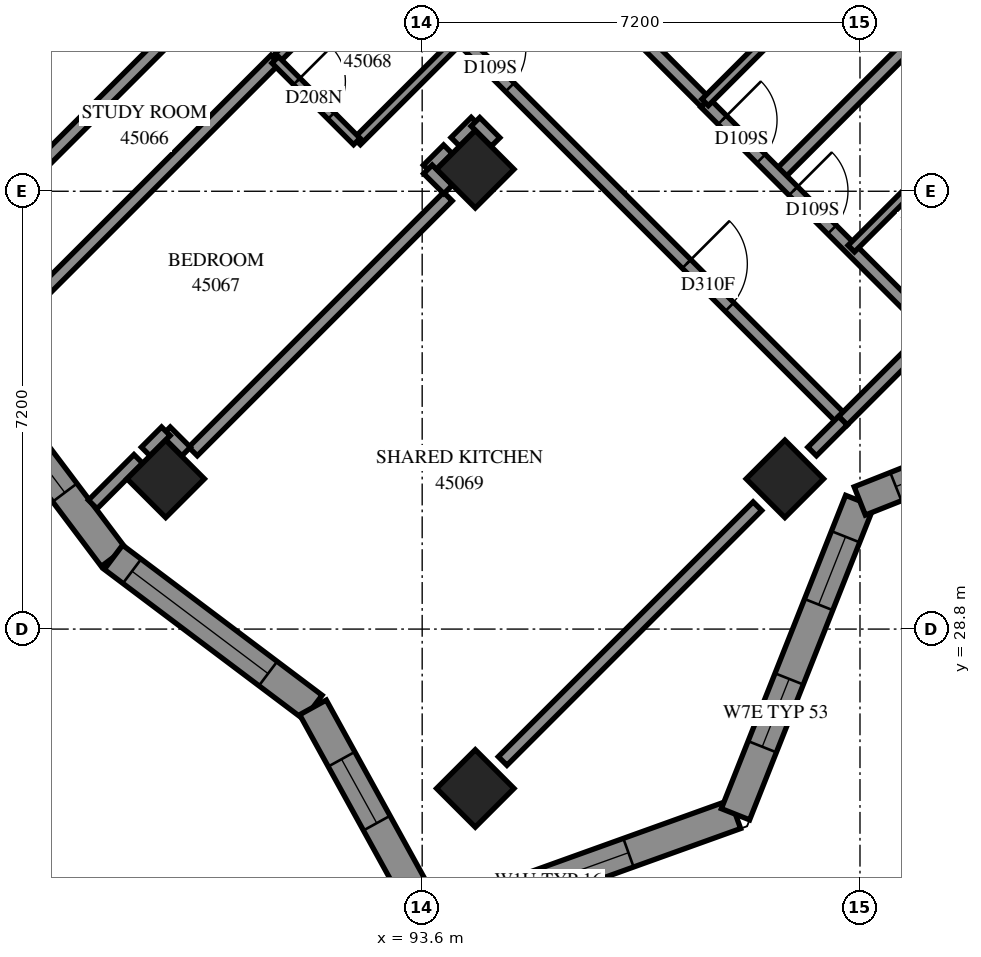
"""IFC4 building model, lengths in metres.
Left out: names, types, materials, properties, quantities, classifications, styles, units other than length and angle.
Written with IfcOpenShell. Run it as: python <this file> out.ifc"""

import sys

from ifc_helpers import new_model, si_unit, direction, frame, frame_2d, origin, origin_2d, place, context, subcontext, project, spatial, polyline, rectangle, outline, extrude, element, fill, save


model = new_model("IFC4")
c1 = context("Model", 3, precision=1e-05, world=origin(), true_north=direction((0.0, 1.0)))
c2 = subcontext(c1, "Body", "Model", "MODEL_VIEW")
j1 = project(units=[si_unit("LENGTHUNIT", "METRE"), si_unit("PLANEANGLEUNIT", "RADIAN")], contexts=[c1])
p1 = place(None, origin())
s1 = spatial("IfcSite", under=j1, at=p1, CompositionType="ELEMENT")
p2 = place(p1, origin())
s2 = spatial("IfcBuilding", under=s1, at=p2, CompositionType="ELEMENT")
p3 = place(p2, frame((0.0, 0.0, 166.0)))
s3 = spatial("IfcBuildingStorey", under=s2, at=p3, CompositionType="ELEMENT", Elevation=166.0)
for number, where, z_axis, x_axis in (
    (1, (94.474, 36.362, 0.0), (0.0, 0.0, 1.0), (0.707, -0.707, 0.0)),
    (2, (89.382, 31.271, 0.0), (0.0, 0.0, 1.0), (0.707, -0.707, 0.0)),
    (3, (99.565, 31.271, 0.0), (0.0, 0.0, 1.0), (0.707, -0.707, 0.0)),
    (4, (94.474, 26.18, 0.0), (0.0, 0.0, 1.0), (0.707, -0.707, 0.0)),
):
    element("IfcColumn", number, at=place(p3, frame(where, z_axis=z_axis, x_axis=x_axis)), inside=s3, PredefinedType="COLUMN", context=c2, shape_type="SweptSolid", body=[
        extrude(rectangle(XDim=0.9, YDim=0.9, at=origin_2d()), origin(), (0.0, 0.0, 1.0), 3.1),
    ])
p4 = place(p3, frame((93.761, 23.961, 0.0), z_axis=(0.0, 0.0, 1.0), x_axis=(0.9410639337, 0.3382287283, 0.0)))
e5 = element("IfcWall", 5, at=p4, inside=s3, PredefinedType="SOLIDWALL", context=c2, shape_type="SweptSolid", body=[
    extrude(outline(polyline([(-0.213, -0.25), (5.417, -0.25), (5.191, 0.25), (0.213, 0.25), (-0.213, -0.25)])), origin(), (0.0, 0.0, 1.0), 3.1),
])
p5 = place(p4, frame((0.634, 0.0, 0.45)))
e6 = element("IfcOpeningElement", 6, at=p5, cuts=e5, PredefinedType="OPENING", context=c2, shape_type="SweptSolid", body=[
    extrude(rectangle(XDim=2.8, YDim=2.5, at=frame_2d((1.4, 1.25))), frame((0.0, 0.26, 0.0), z_axis=(0.0, -1.0, 0.0), x_axis=(1.0, 0.0, 0.0)), (0.0, 0.0, 1.0), 0.52),
])
p6 = place(p3, frame((98.752, 25.755, 0.0), z_axis=(0.0, 0.0, 1.0), x_axis=(0.3687203301, 0.9295403801, 0.0)))
e7 = element("IfcWall", 7, at=p6, inside=s3, PredefinedType="SOLIDWALL", context=c2, shape_type="SweptSolid", body=[
    extrude(outline(polyline([(-0.113, -0.25), (5.435, -0.25), (5.651, 0.25), (0.113, 0.25), (-0.113, -0.25)])), origin(), (0.0, 0.0, 1.0), 3.1),
])
p7 = place(p6, frame((1.194, 0.0, 0.45)))
e8 = element("IfcOpeningElement", 8, at=p7, cuts=e7, PredefinedType="OPENING", context=c2, shape_type="SweptSolid", body=[
    extrude(rectangle(XDim=1.2, YDim=2.5, at=frame_2d((0.6, 1.25))), frame((0.0, 0.26, 0.0), z_axis=(0.0, -1.0, 0.0), x_axis=(1.0, 0.0, 0.0)), (0.0, 0.0, 1.0), 0.52),
])
p8 = place(p6, frame((3.709, 0.0, 0.45)))
e9 = element("IfcOpeningElement", 9, at=p8, cuts=e7, PredefinedType="OPENING", context=c2, shape_type="SweptSolid", body=[
    extrude(rectangle(XDim=1.2, YDim=2.5, at=frame_2d((0.6, 1.25))), frame((0.0, 0.26, 0.0), z_axis=(0.0, -1.0, 0.0), x_axis=(1.0, 0.0, 0.0)), (0.0, 0.0, 1.0), 0.52),
])
p9 = place(p3, frame((100.796, 30.907, 0.0), z_axis=(0.0, 0.0, 1.0), x_axis=(0.9295366495, 0.3687297347, 0.0)))
e10 = element("IfcWall", 10, at=p9, inside=s3, PredefinedType="SOLIDWALL", context=c2, shape_type="SweptSolid", body=[
    extrude(outline(polyline([(0.108, -0.25), (5.656, -0.25), (5.43, 0.25), (-0.108, 0.25), (0.108, -0.25)])), origin(), (0.0, 0.0, 1.0), 3.1),
])
p10 = place(p9, frame((0.638, 0.0, 0.45)))
e11 = element("IfcOpeningElement", 11, at=p10, cuts=e10, PredefinedType="OPENING", context=c2, shape_type="SweptSolid", body=[
    extrude(rectangle(XDim=2.8, YDim=2.5, at=frame_2d((1.4, 1.25))), frame((0.0, 0.26, 0.0), z_axis=(0.0, -1.0, 0.0), x_axis=(1.0, 0.0, 0.0)), (0.0, 0.0, 1.0), 0.52),
])
p11 = place(p3, frame((86.065, 33.248, 0.0), z_axis=(0.0, 0.0, 1.0), x_axis=(0.6012086295, -0.7990920997, 0.0)))
e12 = element("IfcWall", 12, at=p11, inside=s3, PredefinedType="SOLIDWALL", context=c2, shape_type="SweptSolid", body=[
    extrude(outline(polyline([(0.035, -0.25), (4.124, -0.25), (4.053, 0.25), (-0.035, 0.25), (0.035, -0.25)])), origin(), (0.0, 0.0, 1.0), 3.1),
])
p12 = place(p11, frame((0.958, 0.0, 0.7)))
e13 = element("IfcOpeningElement", 13, at=p12, cuts=e12, PredefinedType="OPENING", context=c2, shape_type="SweptSolid", body=[
    extrude(rectangle(XDim=1.8, YDim=2.2, at=frame_2d((0.9, 1.1))), frame((0.0, 0.26, 0.0), z_axis=(0.0, -1.0, 0.0), x_axis=(1.0, 0.0, 0.0)), (0.0, 0.0, 1.0), 0.52),
])
p13 = place(p3, frame((88.523, 29.981, 0.0), z_axis=(0.0, 0.0, 1.0), x_axis=(0.7990931862, -0.6012071854, 0.0)))
e14 = element("IfcWall", 14, at=p13, inside=s3, PredefinedType="SOLIDWALL", context=c2, shape_type="SweptSolid", body=[
    extrude(outline(polyline([(-0.035, -0.25), (4.053, -0.25), (4.16, 0.25), (0.035, 0.25), (-0.035, -0.25)])), origin(), (0.0, 0.0, 1.0), 3.1),
])
p14 = place(p13, frame((0.382, 0.0, 0.45)))
e15 = element("IfcOpeningElement", 15, at=p14, cuts=e14, PredefinedType="OPENING", context=c2, shape_type="SweptSolid", body=[
    extrude(rectangle(XDim=2.8, YDim=2.5, at=frame_2d((1.4, 1.25))), frame((0.0, 0.26, 0.0), z_axis=(0.0, -1.0, 0.0), x_axis=(1.0, 0.0, 0.0)), (0.0, 0.0, 1.0), 0.52),
])
p15 = place(p3, frame((91.804, 27.512, 0.0), z_axis=(0.0, 0.0, 1.0), x_axis=(0.4825680749, -0.8758584664, 0.0)))
e16 = element("IfcWall", 16, at=p15, inside=s3, PredefinedType="SOLIDWALL", context=c2, shape_type="SweptSolid", body=[
    extrude(outline(polyline([(0.054, -0.25), (4.268, -0.25), (3.841, 0.25), (-0.054, 0.25), (0.054, -0.25)])), origin(), (0.0, 0.0, 1.0), 3.1),
])
p16 = place(p15, frame((0.973, 0.0, 0.45)))
e17 = element("IfcOpeningElement", 17, at=p16, cuts=e16, PredefinedType="OPENING", context=c2, shape_type="SweptSolid", body=[
    extrude(rectangle(XDim=1.2, YDim=2.5, at=frame_2d((0.6, 1.25))), frame((0.0, 0.26, 0.0), z_axis=(0.0, -1.0, 0.0), x_axis=(1.0, 0.0, 0.0)), (0.0, 0.0, 1.0), 0.52),
])
p17 = place(p3, frame((91.967, 40.785, 0.0), z_axis=(0.0, 0.0, 1.0), x_axis=(0.7071067812, -0.7071067812, 0.0)))
e18 = element("IfcWall", 18, at=p17, inside=s3, PredefinedType="PARTITIONING", context=c2, shape_type="SweptSolid", body=[
    extrude(rectangle(XDim=12.1, YDim=0.2, at=frame_2d((6.05, 0.0))), origin(), (0.0, 0.0, 1.0), 3.1),
])
p18 = place(p17, frame((3.448, 0.0, 0.0)))
e19 = element("IfcOpeningElement", 19, at=p18, cuts=e18, PredefinedType="OPENING", context=c2, shape_type="SweptSolid", body=[
    extrude(rectangle(XDim=0.9, YDim=2.1, at=frame_2d((0.45, 1.05))), frame((0.0, 0.11, 0.0), z_axis=(0.0, -1.0, 0.0), x_axis=(1.0, 0.0, 0.0)), (0.0, 0.0, 1.0), 0.22),
])
p19 = place(p17, frame((8.457, 0.0, 0.0)))
e20 = element("IfcOpeningElement", 20, at=p19, cuts=e18, PredefinedType="OPENING", context=c2, shape_type="SweptSolid", body=[
    extrude(rectangle(XDim=1.0, YDim=2.1, at=frame_2d((0.5, 1.05))), frame((0.0, 0.11, 0.0), z_axis=(0.0, -1.0, 0.0), x_axis=(1.0, 0.0, 0.0)), (0.0, 0.0, 1.0), 0.22),
])
p20 = place(p3, frame((86.834, 35.94, 0.0), z_axis=(0.0, 0.0, 1.0), x_axis=(0.7072486139, 0.7069649201, 0.0)))
e21 = element("IfcWall", 21, at=p20, inside=s3, PredefinedType="PARTITIONING", context=c2, shape_type="SweptSolid", body=[
    extrude(rectangle(XDim=7.05, YDim=0.2, at=frame_2d((3.525, 0.0))), origin(), (0.0, 0.0, 1.0), 3.1),
])
p21 = place(p20, frame((5.848, 0.0, 0.0)))
e22 = element("IfcOpeningElement", 22, at=p21, cuts=e21, PredefinedType="OPENING", context=c2, shape_type="SweptSolid", body=[
    extrude(rectangle(XDim=1.0, YDim=2.1, at=frame_2d((0.5, 1.05))), frame((0.0, 0.11, 0.0), z_axis=(0.0, -1.0, 0.0), x_axis=(1.0, 0.0, 0.0)), (0.0, 0.0, 1.0), 0.22),
])
p22 = place(p3, frame((86.329, 33.313, 0.0), z_axis=(0.0, 0.0, 1.0), x_axis=(0.7072524412, 0.7069610911, 0.0)))
e23 = element("IfcWall", 23, at=p22, inside=s3, PredefinedType="PARTITIONING", context=c2, shape_type="SweptSolid", body=[
    extrude(rectangle(XDim=6.865, YDim=0.2, at=frame_2d((3.432, 0.0))), origin(), (0.0, 0.0, 1.0), 3.1),
])
p23 = place(p3, frame((99.458, 36.256, 0.0), z_axis=(0.0, 0.0, 1.0), x_axis=(0.7071067812, 0.7071067812, 0.0)))
e24 = element("IfcWall", 24, at=p23, inside=s3, PredefinedType="PARTITIONING", context=c2, shape_type="SweptSolid", body=[
    extrude(rectangle(XDim=6.85, YDim=0.2, at=frame_2d((3.425, 0.0))), origin(), (0.0, 0.0, 1.0), 3.1),
])
p24 = place(p3, frame((89.831, 31.721, 0.0), z_axis=(0.0, 0.0, 1.0), x_axis=(0.7071067812, 0.7071067812, 0.0)))
e25 = element("IfcWall", 25, at=p24, inside=s3, PredefinedType="PARTITIONING", context=c2, shape_type="SweptSolid", body=[
    extrude(rectangle(XDim=5.928, YDim=0.2, at=frame_2d((2.964, 0.0))), origin(), (0.0, 0.0, 1.0), 3.1),
])
p25 = place(p3, frame((94.923, 26.631, 0.0), z_axis=(0.0, 0.0, 1.0), x_axis=(0.7071067812, 0.7071067812, 0.0)))
e26 = element("IfcWall", 26, at=p25, inside=s3, PredefinedType="PARTITIONING", context=c2, shape_type="SweptSolid", body=[
    extrude(rectangle(XDim=5.926, YDim=0.2, at=frame_2d((2.963, 0.0))), origin(), (0.0, 0.0, 1.0), 2.6),
])
p26 = place(p3, frame((98.253, 37.455, 0.0), z_axis=(0.0, 0.0, 1.0), x_axis=(0.7071067812, -0.7071067812, 0.0)))
e27 = element("IfcWall", 27, at=p26, inside=s3, PredefinedType="PARTITIONING", context=c2, shape_type="SweptSolid", body=[
    extrude(rectangle(XDim=5.301, YDim=0.2, at=frame_2d((2.65, 0.0))), origin(), (0.0, 0.0, 1.0), 3.1),
])
p27 = place(p26, frame((0.401, 0.0, 0.0)))
e28 = element("IfcOpeningElement", 28, at=p27, cuts=e27, PredefinedType="OPENING", context=c2, shape_type="SweptSolid", body=[
    extrude(rectangle(XDim=0.9, YDim=2.1, at=frame_2d((0.45, 1.05))), frame((0.0, 0.11, 0.0), z_axis=(0.0, -1.0, 0.0), x_axis=(1.0, 0.0, 0.0)), (0.0, 0.0, 1.0), 0.22),
])
p28 = place(p26, frame((2.05, 0.0, 0.0)))
e29 = element("IfcOpeningElement", 29, at=p28, cuts=e27, PredefinedType="OPENING", context=c2, shape_type="SweptSolid", body=[
    extrude(rectangle(XDim=0.9, YDim=2.1, at=frame_2d((0.45, 1.05))), frame((0.0, 0.11, 0.0), z_axis=(0.0, -1.0, 0.0), x_axis=(1.0, 0.0, 0.0)), (0.0, 0.0, 1.0), 0.22),
])
p29 = place(p3, frame((95.573, 40.148, 0.0), z_axis=(0.0, 0.0, 1.0), x_axis=(0.7068698107, -0.7073436723, 0.0)))
e30 = element("IfcWall", 30, at=p29, inside=s3, PredefinedType="PARTITIONING", context=c2, shape_type="SweptSolid", body=[
    extrude(rectangle(XDim=3.799, YDim=0.2, at=frame_2d((1.899, 0.0))), origin(), (0.0, 0.0, 1.0), 3.1),
])
for number, where, z_axis, x_axis in (
    (31, (98.253, 37.461, 0.0), (0.0, 0.0, 1.0), (0.708, 0.707, 0.0)),
    (32, (100.657, 35.057, 0.0), (0.0, 0.0, 1.0), (0.708, 0.707, 0.0)),
    (33, (91.189, 38.161, 0.0), (0.0, 0.0, 1.0), (0.707, 0.708, 0.0)),
    (34, (92.531, 36.819, 0.0), (0.0, 0.0, 1.0), (0.708, 0.707, 0.0)),
):
    element("IfcWall", number, at=place(p3, frame(where, z_axis=z_axis, x_axis=x_axis)), inside=s3, PredefinedType="PARTITIONING", context=c2, shape_type="SweptSolid", body=[
        extrude(rectangle(XDim=2.4, YDim=0.15, at=frame_2d((1.2, 0.0))), origin(), (0.0, 0.0, 1.0), 3.1),
    ])
p30 = place(p3, frame((100.519, 32.227, 0.0), z_axis=(0.0, 0.0, 1.0), x_axis=(0.7071067812, 0.7071067812, 0.0)))
e35 = element("IfcWall", 35, at=p30, inside=s3, PredefinedType="PARTITIONING", context=c2, shape_type="SweptSolid", body=[
    extrude(rectangle(XDim=2.099, YDim=0.2, at=frame_2d((1.049, 0.0))), origin(), (0.0, 0.0, 1.0), 2.6),
])
p31 = place(p3, frame((91.183, 38.161, 0.0), z_axis=(0.0, 0.0, 1.0), x_axis=(0.7071067812, -0.7071067812, 0.0)))
e36 = element("IfcWall", 36, at=p31, inside=s3, PredefinedType="PARTITIONING", context=c2, shape_type="SweptSolid", body=[
    extrude(rectangle(XDim=1.898, YDim=0.15, at=frame_2d((0.949, 0.0))), origin(), (0.0, 0.0, 1.0), 3.1),
])
p32 = place(p31, frame((0.501, 0.0, 0.0)))
e37 = element("IfcOpeningElement", 37, at=p32, cuts=e36, PredefinedType="OPENING", context=c2, shape_type="SweptSolid", body=[
    extrude(rectangle(XDim=0.8, YDim=2.1, at=frame_2d((0.4, 1.05))), frame((0.0, 0.085, 0.0), z_axis=(0.0, -1.0, 0.0), x_axis=(1.0, 0.0, 0.0)), (0.0, 0.0, 1.0), 0.17),
])
p33 = place(p3, frame((88.182, 30.85, 0.0), z_axis=(0.0, 0.0, 1.0), x_axis=(0.7071067812, 0.7071067812, 0.0)))
e38 = element("IfcWall", 38, at=p33, inside=s3, PredefinedType="PARTITIONING", context=c2, shape_type="SweptSolid", body=[
    extrude(rectangle(XDim=1.059, YDim=0.2, at=frame_2d((0.53, 0.0))), origin(), (0.0, 0.0, 1.0), 3.1),
])
p34 = place(p3, frame((100.013, 31.721, 0.0), z_axis=(0.0, 0.0, 1.0), x_axis=(0.7071067812, 0.7071067812, 0.0)))
e39 = element("IfcWall", 39, at=p34, inside=s3, PredefinedType="PARTITIONING", context=c2, shape_type="SweptSolid", body=[
    extrude(rectangle(XDim=0.716, YDim=0.2, at=frame_2d((0.358, 0.0))), origin(), (0.0, 0.0, 1.0), 2.6),
])
for number, where, z_axis, x_axis in (
    (40, (94.145, 36.813, 0.0), (0.0, 0.0, 1.0), (0.707, 0.707, 0.0)),
    (41, (89.386, 32.052, 0.0), (0.0, 0.0, 1.0), (0.707, -0.707, 0.0)),
    (42, (89.053, 31.721, 0.0), (0.0, 0.0, 1.0), (0.707, 0.707, 0.0)),
    (43, (93.691, 36.359, 0.0), (0.0, 0.0, 1.0), (0.707, 0.707, 0.0)),
):
    element("IfcWall", number, at=place(p3, frame(where, z_axis=z_axis, x_axis=x_axis)), inside=s3, PredefinedType="PARTITIONING", context=c2, shape_type="SweptSolid", body=[
        extrude(rectangle(XDim=0.469, YDim=0.2, at=frame_2d((0.235, 0.0))), origin(), (0.0, 0.0, 1.0), 3.1),
    ])
for number, where, z_axis, x_axis in (
    (44, (94.476, 37.142, 0.0), (0.0, 0.0, 1.0), (0.705, -0.709, 0.0)),
    (45, (93.695, 36.361, 0.0), (0.0, 0.0, 1.0), (0.709, -0.705, 0.0)),
):
    element("IfcWall", number, at=place(p3, frame(where, z_axis=z_axis, x_axis=x_axis)), inside=s3, PredefinedType="PARTITIONING", context=c2, shape_type="SweptSolid", body=[
        extrude(rectangle(XDim=0.468, YDim=0.2, at=frame_2d((0.234, 0.0))), origin(), (0.0, 0.0, 1.0), 3.1),
    ])
p35 = place(p5, origin())
e46 = element("IfcWindow", 46, at=p35, inside=s3, PartitioningType="SINGLE_PANEL", PredefinedType="WINDOW", context=c2, shape_type="SweptSolid", body=[
    extrude(rectangle(XDim=2.8, YDim=2.5, at=frame_2d((1.4, 1.25))), frame((0.0, 0.18, 0.0), z_axis=(0.0, -1.0, 0.0), x_axis=(1.0, 0.0, 0.0)), (0.0, 0.0, 1.0), 0.06),
])
fill(e6, e46)
p36 = place(p7, origin())
e47 = element("IfcWindow", 47, at=p36, inside=s3, PartitioningType="SINGLE_PANEL", PredefinedType="WINDOW", context=c2, shape_type="SweptSolid", body=[
    extrude(rectangle(XDim=1.2, YDim=2.5, at=frame_2d((0.6, 1.25))), frame((0.0, 0.18, 0.0), z_axis=(0.0, -1.0, 0.0), x_axis=(1.0, 0.0, 0.0)), (0.0, 0.0, 1.0), 0.06),
])
fill(e8, e47)
p37 = place(p8, origin())
e48 = element("IfcWindow", 48, at=p37, inside=s3, PartitioningType="SINGLE_PANEL", PredefinedType="WINDOW", context=c2, shape_type="SweptSolid", body=[
    extrude(rectangle(XDim=1.2, YDim=2.5, at=frame_2d((0.6, 1.25))), frame((0.0, 0.18, 0.0), z_axis=(0.0, -1.0, 0.0), x_axis=(1.0, 0.0, 0.0)), (0.0, 0.0, 1.0), 0.06),
])
fill(e9, e48)
p38 = place(p10, origin())
e49 = element("IfcWindow", 49, at=p38, inside=s3, PartitioningType="SINGLE_PANEL", PredefinedType="WINDOW", context=c2, shape_type="SweptSolid", body=[
    extrude(rectangle(XDim=2.8, YDim=2.5, at=frame_2d((1.4, 1.25))), frame((0.0, 0.18, 0.0), z_axis=(0.0, -1.0, 0.0), x_axis=(1.0, 0.0, 0.0)), (0.0, 0.0, 1.0), 0.06),
])
fill(e11, e49)
p39 = place(p14, origin())
e50 = element("IfcWindow", 50, at=p39, inside=s3, PartitioningType="SINGLE_PANEL", PredefinedType="WINDOW", context=c2, shape_type="SweptSolid", body=[
    extrude(rectangle(XDim=2.8, YDim=2.5, at=frame_2d((1.4, 1.25))), frame((0.0, 0.18, 0.0), z_axis=(0.0, -1.0, 0.0), x_axis=(1.0, 0.0, 0.0)), (0.0, 0.0, 1.0), 0.06),
])
fill(e15, e50)
p40 = place(p16, origin())
e51 = element("IfcWindow", 51, at=p40, inside=s3, PartitioningType="SINGLE_PANEL", PredefinedType="WINDOW", context=c2, shape_type="SweptSolid", body=[
    extrude(rectangle(XDim=1.2, YDim=2.5, at=frame_2d((0.6, 1.25))), frame((0.0, 0.18, 0.0), z_axis=(0.0, -1.0, 0.0), x_axis=(1.0, 0.0, 0.0)), (0.0, 0.0, 1.0), 0.06),
])
fill(e17, e51)
p41 = place(p27, origin())
e52 = element("IfcDoor", 52, at=p41, inside=s3, OperationType="SINGLE_SWING_LEFT", PredefinedType="DOOR", context=c2, shape_type="SweptSolid", body=[
    extrude(rectangle(XDim=0.9, YDim=2.1, at=frame_2d((0.45, 1.05))), frame((0.0, 0.025, 0.0), z_axis=(0.0, -1.0, 0.0), x_axis=(1.0, 0.0, 0.0)), (0.0, 0.0, 1.0), 0.05),
])
fill(e28, e52)
p42 = place(p18, origin())
e53 = element("IfcDoor", 53, at=p42, inside=s3, OperationType="SINGLE_SWING_LEFT", PredefinedType="DOOR", context=c2, shape_type="SweptSolid", body=[
    extrude(rectangle(XDim=0.9, YDim=2.1, at=frame_2d((0.45, 1.05))), frame((0.0, 0.025, 0.0), z_axis=(0.0, -1.0, 0.0), x_axis=(1.0, 0.0, 0.0)), (0.0, 0.0, 1.0), 0.05),
])
fill(e19, e53)
p43 = place(p32, origin())
e54 = element("IfcDoor", 54, at=p43, inside=s3, OperationType="SINGLE_SWING_RIGHT", PredefinedType="DOOR", context=c2, shape_type="SweptSolid", body=[
    extrude(rectangle(XDim=0.8, YDim=2.1, at=frame_2d((0.4, 1.05))), frame((0.0, 0.025, 0.0), z_axis=(0.0, -1.0, 0.0), x_axis=(1.0, 0.0, 0.0)), (0.0, 0.0, 1.0), 0.05),
])
fill(e37, e54)
p44 = place(p19, origin())
e55 = element("IfcDoor", 55, at=p44, inside=s3, OperationType="SINGLE_SWING_RIGHT", PredefinedType="DOOR", context=c2, shape_type="SweptSolid", body=[
    extrude(rectangle(XDim=1.0, YDim=2.1, at=frame_2d((0.5, 1.05))), frame((0.0, 0.025, 0.0), z_axis=(0.0, -1.0, 0.0), x_axis=(1.0, 0.0, 0.0)), (0.0, 0.0, 1.0), 0.05),
])
fill(e20, e55)
p45 = place(p28, origin())
e56 = element("IfcDoor", 56, at=p45, inside=s3, OperationType="SINGLE_SWING_RIGHT", PredefinedType="DOOR", context=c2, shape_type="SweptSolid", body=[
    extrude(rectangle(XDim=0.9, YDim=2.1, at=frame_2d((0.45, 1.05))), frame((0.0, 0.025, 0.0), z_axis=(0.0, -1.0, 0.0), x_axis=(1.0, 0.0, 0.0)), (0.0, 0.0, 1.0), 0.05),
])
fill(e29, e56)
p46 = place(p12, origin())
e57 = element("IfcWindow", 57, at=p46, inside=s3, PartitioningType="SINGLE_PANEL", PredefinedType="WINDOW", context=c2, shape_type="SweptSolid", body=[
    extrude(rectangle(XDim=1.8, YDim=2.2, at=frame_2d((0.9, 1.1))), frame((0.0, 0.18, 0.0), z_axis=(0.0, -1.0, 0.0), x_axis=(1.0, 0.0, 0.0)), (0.0, 0.0, 1.0), 0.06),
])
fill(e13, e57)
save(model, sys.argv[1])
